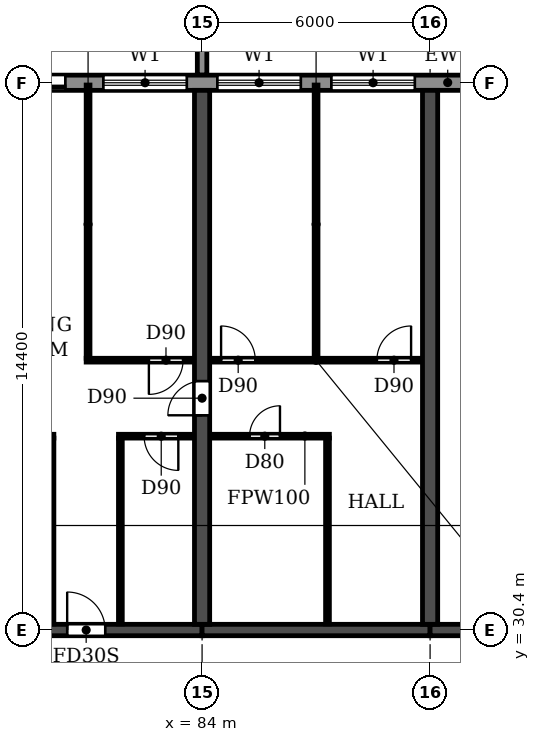
"""IFC4 building model, lengths in metres.
Left out: names, types, materials, properties, quantities, classifications, styles, units other than length and angle.
Written with IfcOpenShell. Run it as: python <this file> out.ifc"""

import sys

from ifc_helpers import new_model, si_unit, direction, frame, frame_2d, origin, place, context, subcontext, project, spatial, polyline, rectangle, outline, extrude, source, transform, mapped, element, fill, save


model = new_model("IFC4")
c1 = context("Model", 3, precision=1e-05, world=origin(), true_north=direction((0.0, 1.0)))
c2 = subcontext(c1, "Body", "Model", "MODEL_VIEW")
j1 = project(units=[si_unit("LENGTHUNIT", "METRE"), si_unit("PLANEANGLEUNIT", "RADIAN")], contexts=[c1])
p1 = place(None, origin())
s1 = spatial("IfcSite", under=j1, at=p1, CompositionType="ELEMENT")
p2 = place(p1, origin())
s2 = spatial("IfcBuilding", under=s1, at=p2, CompositionType="ELEMENT")
p3 = place(p2, frame((0.0, 0.0, 56.4)))
s3 = spatial("IfcBuildingStorey", under=s2, at=p3, CompositionType="ELEMENT", Elevation=56.4)
p4 = place(p3, frame((84.0, 30.55, 0.0), z_axis=(0.0, 0.0, 1.0), x_axis=(0.0, 1.0, 0.0)))
e1 = element("IfcWall", 1, at=p4, inside=s3, PredefinedType="SHEAR", context=c2, shape_type="SweptSolid", body=[
    extrude(rectangle(XDim=14.05, YDim=0.4, at=frame_2d((7.025, 0.0))), origin(), (0.0, 0.0, 1.0), 3.05),
])
p5 = place(p4, frame((5.5, 0.0, 0.0)))
e2 = element("IfcOpeningElement", 2, at=p5, cuts=e1, PredefinedType="OPENING", context=c2, shape_type="SweptSolid", body=[
    extrude(rectangle(XDim=0.9, YDim=2.1, at=frame_2d((0.45, 1.05))), frame((0.0, 0.21, 0.0), z_axis=(0.0, -1.0, 0.0), x_axis=(1.0, 0.0, 0.0)), (0.0, 0.0, 1.0), 0.42),
])
p6 = place(p3, frame((90.0, 30.55, 0.0), z_axis=(0.0, 0.0, 1.0), x_axis=(0.0, 1.0, 0.0)))
e3 = element("IfcWall", 3, at=p6, inside=s3, PredefinedType="SHEAR", context=c2, shape_type="SweptSolid", body=[
    extrude(rectangle(XDim=14.05, YDim=0.4, at=frame_2d((7.025, 0.0))), origin(), (0.0, 0.0, 1.0), 3.05),
])
p7 = place(p3, frame((78.0, 30.4, 0.0), z_axis=(0.0, 0.0, 1.0), x_axis=(1.0, 0.0, 0.0)))
e4 = element("IfcWall", 4, at=p7, inside=s3, PredefinedType="SHEAR", context=c2, shape_type="SweptSolid", body=[
    extrude(rectangle(XDim=6.0, YDim=0.3, at=frame_2d((3.0, 0.0))), origin(), (0.0, 0.0, 1.0), 2.45),
])
p8 = place(p7, frame((2.45, 0.0, 0.0)))
e5 = element("IfcOpeningElement", 5, at=p8, cuts=e4, PredefinedType="OPENING", context=c2, shape_type="SweptSolid", body=[
    extrude(rectangle(XDim=1.0, YDim=2.1, at=frame_2d((0.5, 1.05))), frame((0.0, 0.16, 0.0), z_axis=(0.0, -1.0, 0.0), x_axis=(1.0, 0.0, 0.0)), (0.0, 0.0, 1.0), 0.32),
])
p9 = place(p3, frame((84.0, 30.4, 0.0), z_axis=(0.0, 0.0, 1.0), x_axis=(1.0, 0.0, 0.0)))
e6 = element("IfcWall", 6, at=p9, inside=s3, PredefinedType="SHEAR", context=c2, shape_type="SweptSolid", body=[
    extrude(rectangle(XDim=6.0, YDim=0.3, at=frame_2d((3.0, 0.0))), origin(), (0.0, 0.0, 1.0), 2.45),
])
p10 = place(p3, frame((90.0, 30.4, 0.0), z_axis=(0.0, 0.0, 1.0), x_axis=(1.0, 0.0, 0.0)))
e7 = element("IfcWall", 7, at=p10, inside=s3, PredefinedType="SHEAR", context=c2, shape_type="SweptSolid", body=[
    extrude(rectangle(XDim=5.8, YDim=0.3, at=frame_2d((2.9, 0.0))), origin(), (0.0, 0.0, 1.0), 2.45),
])
p11 = place(p10, frame((2.5, 0.0, 0.0)))
e8 = element("IfcOpeningElement", 8, at=p11, cuts=e7, PredefinedType="OPENING", context=c2, shape_type="SweptSolid", body=[
    extrude(rectangle(XDim=1.0, YDim=2.1, at=frame_2d((0.5, 1.05))), frame((0.0, 0.16, 0.0), z_axis=(0.0, -1.0, 0.0), x_axis=(1.0, 0.0, 0.0)), (0.0, 0.0, 1.0), 0.32),
])
p12 = place(p3, frame((91.317, 44.8, 0.0), z_axis=(0.0, 0.0, 1.0), x_axis=(-1.0, 0.0, 0.0)))
e9 = element("IfcWall", 9, at=p12, inside=s3, PredefinedType="STANDARD", context=c2, shape_type="SweptSolid", body=[
    extrude(rectangle(XDim=80.634, YDim=0.4, at=frame_2d((40.317, 0.0))), origin(), (0.0, 0.0, 1.0), 3.05),
])
p13 = place(p12, frame((76.717, 0.0, 0.9)))
e10 = element("IfcOpeningElement", 10, at=p13, cuts=e9, PredefinedType="OPENING", context=c2, shape_type="SweptSolid", body=[
    extrude(rectangle(XDim=2.2, YDim=1.5, at=frame_2d((1.1, 0.75))), frame((0.0, 0.21, 0.0), z_axis=(0.0, -1.0, 0.0), x_axis=(1.0, 0.0, 0.0)), (0.0, 0.0, 1.0), 0.42),
])
p14 = place(p12, frame((73.917, 0.0, 0.0)))
e11 = element("IfcOpeningElement", 11, at=p14, cuts=e9, PredefinedType="OPENING", context=c2, shape_type="SweptSolid", body=[
    extrude(rectangle(XDim=1.8, YDim=2.4, at=frame_2d((0.9, 1.2))), frame((0.0, 0.21, 0.0), z_axis=(0.0, -1.0, 0.0), x_axis=(1.0, 0.0, 0.0)), (0.0, 0.0, 1.0), 0.42),
])
p15 = place(p12, frame((70.717, 0.0, 0.9)))
e12 = element("IfcOpeningElement", 12, at=p15, cuts=e9, PredefinedType="OPENING", context=c2, shape_type="SweptSolid", body=[
    extrude(rectangle(XDim=2.2, YDim=1.5, at=frame_2d((1.1, 0.75))), frame((0.0, 0.21, 0.0), z_axis=(0.0, -1.0, 0.0), x_axis=(1.0, 0.0, 0.0)), (0.0, 0.0, 1.0), 0.42),
])
p16 = place(p12, frame((67.917, 0.0, 0.0)))
e13 = element("IfcOpeningElement", 13, at=p16, cuts=e9, PredefinedType="OPENING", context=c2, shape_type="SweptSolid", body=[
    extrude(rectangle(XDim=1.8, YDim=2.4, at=frame_2d((0.9, 1.2))), frame((0.0, 0.21, 0.0), z_axis=(0.0, -1.0, 0.0), x_axis=(1.0, 0.0, 0.0)), (0.0, 0.0, 1.0), 0.42),
])
p17 = place(p12, frame((64.717, 0.0, 0.9)))
e14 = element("IfcOpeningElement", 14, at=p17, cuts=e9, PredefinedType="OPENING", context=c2, shape_type="SweptSolid", body=[
    extrude(rectangle(XDim=2.2, YDim=1.5, at=frame_2d((1.1, 0.75))), frame((0.0, 0.21, 0.0), z_axis=(0.0, -1.0, 0.0), x_axis=(1.0, 0.0, 0.0)), (0.0, 0.0, 1.0), 0.42),
])
p18 = place(p12, frame((61.917, 0.0, 0.0)))
e15 = element("IfcOpeningElement", 15, at=p18, cuts=e9, PredefinedType="OPENING", context=c2, shape_type="SweptSolid", body=[
    extrude(rectangle(XDim=1.8, YDim=2.4, at=frame_2d((0.9, 1.2))), frame((0.0, 0.21, 0.0), z_axis=(0.0, -1.0, 0.0), x_axis=(1.0, 0.0, 0.0)), (0.0, 0.0, 1.0), 0.42),
])
p19 = place(p12, frame((58.717, 0.0, 0.9)))
e16 = element("IfcOpeningElement", 16, at=p19, cuts=e9, PredefinedType="OPENING", context=c2, shape_type="SweptSolid", body=[
    extrude(rectangle(XDim=2.2, YDim=1.5, at=frame_2d((1.1, 0.75))), frame((0.0, 0.21, 0.0), z_axis=(0.0, -1.0, 0.0), x_axis=(1.0, 0.0, 0.0)), (0.0, 0.0, 1.0), 0.42),
])
p20 = place(p12, frame((55.717, 0.0, 0.9)))
e17 = element("IfcOpeningElement", 17, at=p20, cuts=e9, PredefinedType="OPENING", context=c2, shape_type="SweptSolid", body=[
    extrude(rectangle(XDim=2.2, YDim=1.5, at=frame_2d((1.1, 0.75))), frame((0.0, 0.21, 0.0), z_axis=(0.0, -1.0, 0.0), x_axis=(1.0, 0.0, 0.0)), (0.0, 0.0, 1.0), 0.42),
])
p21 = place(p12, frame((52.917, 0.0, 0.0)))
e18 = element("IfcOpeningElement", 18, at=p21, cuts=e9, PredefinedType="OPENING", context=c2, shape_type="SweptSolid", body=[
    extrude(rectangle(XDim=1.8, YDim=2.4, at=frame_2d((0.9, 1.2))), frame((0.0, 0.21, 0.0), z_axis=(0.0, -1.0, 0.0), x_axis=(1.0, 0.0, 0.0)), (0.0, 0.0, 1.0), 0.42),
])
p22 = place(p12, frame((49.717, 0.0, 0.9)))
e19 = element("IfcOpeningElement", 19, at=p22, cuts=e9, PredefinedType="OPENING", context=c2, shape_type="SweptSolid", body=[
    extrude(rectangle(XDim=2.2, YDim=1.5, at=frame_2d((1.1, 0.75))), frame((0.0, 0.21, 0.0), z_axis=(0.0, -1.0, 0.0), x_axis=(1.0, 0.0, 0.0)), (0.0, 0.0, 1.0), 0.42),
])
p23 = place(p12, frame((46.917, 0.0, 0.0)))
e20 = element("IfcOpeningElement", 20, at=p23, cuts=e9, PredefinedType="OPENING", context=c2, shape_type="SweptSolid", body=[
    extrude(rectangle(XDim=1.8, YDim=2.4, at=frame_2d((0.9, 1.2))), frame((0.0, 0.21, 0.0), z_axis=(0.0, -1.0, 0.0), x_axis=(1.0, 0.0, 0.0)), (0.0, 0.0, 1.0), 0.42),
])
p24 = place(p12, frame((43.717, 0.0, 0.9)))
e21 = element("IfcOpeningElement", 21, at=p24, cuts=e9, PredefinedType="OPENING", context=c2, shape_type="SweptSolid", body=[
    extrude(rectangle(XDim=2.2, YDim=1.5, at=frame_2d((1.1, 0.75))), frame((0.0, 0.21, 0.0), z_axis=(0.0, -1.0, 0.0), x_axis=(1.0, 0.0, 0.0)), (0.0, 0.0, 1.0), 0.42),
])
p25 = place(p12, frame((40.717, 0.0, 0.9)))
e22 = element("IfcOpeningElement", 22, at=p25, cuts=e9, PredefinedType="OPENING", context=c2, shape_type="SweptSolid", body=[
    extrude(rectangle(XDim=2.2, YDim=1.5, at=frame_2d((1.1, 0.75))), frame((0.0, 0.21, 0.0), z_axis=(0.0, -1.0, 0.0), x_axis=(1.0, 0.0, 0.0)), (0.0, 0.0, 1.0), 0.42),
])
p26 = place(p12, frame((37.717, 0.0, 0.9)))
e23 = element("IfcOpeningElement", 23, at=p26, cuts=e9, PredefinedType="OPENING", context=c2, shape_type="SweptSolid", body=[
    extrude(rectangle(XDim=2.2, YDim=1.5, at=frame_2d((1.1, 0.75))), frame((0.0, 0.21, 0.0), z_axis=(0.0, -1.0, 0.0), x_axis=(1.0, 0.0, 0.0)), (0.0, 0.0, 1.0), 0.42),
])
p27 = place(p12, frame((34.717, 0.0, 0.9)))
e24 = element("IfcOpeningElement", 24, at=p27, cuts=e9, PredefinedType="OPENING", context=c2, shape_type="SweptSolid", body=[
    extrude(rectangle(XDim=2.2, YDim=1.5, at=frame_2d((1.1, 0.75))), frame((0.0, 0.21, 0.0), z_axis=(0.0, -1.0, 0.0), x_axis=(1.0, 0.0, 0.0)), (0.0, 0.0, 1.0), 0.42),
])
p28 = place(p12, frame((31.917, 0.0, 0.0)))
e25 = element("IfcOpeningElement", 25, at=p28, cuts=e9, PredefinedType="OPENING", context=c2, shape_type="SweptSolid", body=[
    extrude(rectangle(XDim=1.8, YDim=2.4, at=frame_2d((0.9, 1.2))), frame((0.0, 0.21, 0.0), z_axis=(0.0, -1.0, 0.0), x_axis=(1.0, 0.0, 0.0)), (0.0, 0.0, 1.0), 0.42),
])
p29 = place(p12, frame((28.917, 0.0, 0.0)))
e26 = element("IfcOpeningElement", 26, at=p29, cuts=e9, PredefinedType="OPENING", context=c2, shape_type="SweptSolid", body=[
    extrude(rectangle(XDim=1.8, YDim=2.4, at=frame_2d((0.9, 1.2))), frame((0.0, 0.21, 0.0), z_axis=(0.0, -1.0, 0.0), x_axis=(1.0, 0.0, 0.0)), (0.0, 0.0, 1.0), 0.42),
])
p30 = place(p12, frame((25.717, 0.0, 0.9)))
e27 = element("IfcOpeningElement", 27, at=p30, cuts=e9, PredefinedType="OPENING", context=c2, shape_type="SweptSolid", body=[
    extrude(rectangle(XDim=2.2, YDim=1.5, at=frame_2d((1.1, 0.75))), frame((0.0, 0.21, 0.0), z_axis=(0.0, -1.0, 0.0), x_axis=(1.0, 0.0, 0.0)), (0.0, 0.0, 1.0), 0.42),
])
p31 = place(p12, frame((22.917, 0.0, 0.0)))
e28 = element("IfcOpeningElement", 28, at=p31, cuts=e9, PredefinedType="OPENING", context=c2, shape_type="SweptSolid", body=[
    extrude(rectangle(XDim=1.8, YDim=2.4, at=frame_2d((0.9, 1.2))), frame((0.0, 0.21, 0.0), z_axis=(0.0, -1.0, 0.0), x_axis=(1.0, 0.0, 0.0)), (0.0, 0.0, 1.0), 0.42),
])
p32 = place(p12, frame((19.717, 0.0, 0.9)))
e29 = element("IfcOpeningElement", 29, at=p32, cuts=e9, PredefinedType="OPENING", context=c2, shape_type="SweptSolid", body=[
    extrude(rectangle(XDim=2.2, YDim=1.5, at=frame_2d((1.1, 0.75))), frame((0.0, 0.21, 0.0), z_axis=(0.0, -1.0, 0.0), x_axis=(1.0, 0.0, 0.0)), (0.0, 0.0, 1.0), 0.42),
])
p33 = place(p12, frame((16.917, 0.0, 0.0)))
e30 = element("IfcOpeningElement", 30, at=p33, cuts=e9, PredefinedType="OPENING", context=c2, shape_type="SweptSolid", body=[
    extrude(rectangle(XDim=1.8, YDim=2.4, at=frame_2d((0.9, 1.2))), frame((0.0, 0.21, 0.0), z_axis=(0.0, -1.0, 0.0), x_axis=(1.0, 0.0, 0.0)), (0.0, 0.0, 1.0), 0.42),
])
p34 = place(p12, frame((13.717, 0.0, 0.9)))
e31 = element("IfcOpeningElement", 31, at=p34, cuts=e9, PredefinedType="OPENING", context=c2, shape_type="SweptSolid", body=[
    extrude(rectangle(XDim=2.2, YDim=1.5, at=frame_2d((1.1, 0.75))), frame((0.0, 0.21, 0.0), z_axis=(0.0, -1.0, 0.0), x_axis=(1.0, 0.0, 0.0)), (0.0, 0.0, 1.0), 0.42),
])
p35 = place(p12, frame((10.917, 0.0, 0.0)))
e32 = element("IfcOpeningElement", 32, at=p35, cuts=e9, PredefinedType="OPENING", context=c2, shape_type="SweptSolid", body=[
    extrude(rectangle(XDim=1.8, YDim=2.4, at=frame_2d((0.9, 1.2))), frame((0.0, 0.21, 0.0), z_axis=(0.0, -1.0, 0.0), x_axis=(1.0, 0.0, 0.0)), (0.0, 0.0, 1.0), 0.42),
])
p36 = place(p12, frame((7.717, 0.0, 0.9)))
e33 = element("IfcOpeningElement", 33, at=p36, cuts=e9, PredefinedType="OPENING", context=c2, shape_type="SweptSolid", body=[
    extrude(rectangle(XDim=2.2, YDim=1.5, at=frame_2d((1.1, 0.75))), frame((0.0, 0.21, 0.0), z_axis=(0.0, -1.0, 0.0), x_axis=(1.0, 0.0, 0.0)), (0.0, 0.0, 1.0), 0.42),
])
p37 = place(p12, frame((4.717, 0.0, 0.9)))
e34 = element("IfcOpeningElement", 34, at=p37, cuts=e9, PredefinedType="OPENING", context=c2, shape_type="SweptSolid", body=[
    extrude(rectangle(XDim=2.2, YDim=1.5, at=frame_2d((1.1, 0.75))), frame((0.0, 0.21, 0.0), z_axis=(0.0, -1.0, 0.0), x_axis=(1.0, 0.0, 0.0)), (0.0, 0.0, 1.0), 0.42),
])
p38 = place(p12, frame((1.717, 0.0, 0.9)))
e35 = element("IfcOpeningElement", 35, at=p38, cuts=e9, PredefinedType="OPENING", context=c2, shape_type="SweptSolid", body=[
    extrude(rectangle(XDim=2.2, YDim=1.5, at=frame_2d((1.1, 0.75))), frame((0.0, 0.21, 0.0), z_axis=(0.0, -1.0, 0.0), x_axis=(1.0, 0.0, 0.0)), (0.0, 0.0, 1.0), 0.42),
])
m1 = source(origin(), c2, "Body", "SweptSolid", [
    extrude(outline(polyline([(0.0, 0.0), (0.25, 0.0), (0.25, 3.1), (0.0, 3.1), (0.0, 0.0)])), origin(), (0.0, 0.0, 1.0), 3.1),
])
p39 = place(p3, frame((83.875, 45.0, 0.0)))
e36 = element("IfcWall", 36, at=p39, inside=s3, PredefinedType="STANDARD", context=c2, shape_type="MappedRepresentation", body=[
    mapped(m1, transform((0.0, 0.0, 0.0))),
])
p40 = place(p3, frame((78.21, 35.5, 0.0), z_axis=(0.0, 0.0, 1.0), x_axis=(1.0, 0.0, 0.0)))
e37 = element("IfcWall", 37, at=p40, inside=s3, PredefinedType="PARTITIONING", context=c2, shape_type="SweptSolid", body=[
    extrude(rectangle(XDim=1.89, YDim=0.1, at=frame_2d((0.945, 0.0))), origin(), (0.0, 0.0, 1.0), 3.05),
])
p41 = place(p40, frame((0.415, 0.0, 0.0)))
e38 = element("IfcOpeningElement", 38, at=p41, cuts=e37, PredefinedType="OPENING", context=c2, shape_type="SweptSolid", body=[
    extrude(rectangle(XDim=0.8, YDim=2.1, at=frame_2d((0.4, 1.05))), frame((0.0, 0.06, 0.0), z_axis=(0.0, -1.0, 0.0), x_axis=(1.0, 0.0, 0.0)), (0.0, 0.0, 1.0), 0.12),
])
p42 = place(p3, frame((81.8, 35.5, 0.0), z_axis=(0.0, 0.0, 1.0), x_axis=(1.0, 0.0, 0.0)))
e39 = element("IfcWall", 39, at=p42, inside=s3, PredefinedType="PARTITIONING", context=c2, shape_type="SweptSolid", body=[
    extrude(rectangle(XDim=1.99, YDim=0.1, at=frame_2d((0.995, 0.0))), origin(), (0.0, 0.0, 1.0), 3.05),
])
p43 = place(p42, frame((0.675, 0.0, 0.0)))
e40 = element("IfcOpeningElement", 40, at=p43, cuts=e39, PredefinedType="OPENING", context=c2, shape_type="SweptSolid", body=[
    extrude(rectangle(XDim=0.9, YDim=2.1, at=frame_2d((0.45, 1.05))), frame((0.0, 0.06, 0.0), z_axis=(0.0, -1.0, 0.0), x_axis=(1.0, 0.0, 0.0)), (0.0, 0.0, 1.0), 0.12),
])
p44 = place(p3, frame((84.21, 35.5, 0.0), z_axis=(0.0, 0.0, 1.0), x_axis=(1.0, 0.0, 0.0)))
e41 = element("IfcWall", 41, at=p44, inside=s3, PredefinedType="PARTITIONING", context=c2, shape_type="SweptSolid", body=[
    extrude(rectangle(XDim=3.14, YDim=0.1, at=frame_2d((1.57, 0.0))), origin(), (0.0, 0.0, 1.0), 3.05),
])
p45 = place(p44, frame((1.04, 0.0, 0.0)))
e42 = element("IfcOpeningElement", 42, at=p45, cuts=e41, PredefinedType="OPENING", context=c2, shape_type="SweptSolid", body=[
    extrude(rectangle(XDim=0.8, YDim=2.1, at=frame_2d((0.4, 1.05))), frame((0.0, 0.06, 0.0), z_axis=(0.0, -1.0, 0.0), x_axis=(1.0, 0.0, 0.0)), (0.0, 0.0, 1.0), 0.12),
])
p46 = place(p3, frame((80.95, 37.5, 0.0), z_axis=(0.0, 0.0, 1.0), x_axis=(1.0, 0.0, 0.0)))
e43 = element("IfcWall", 43, at=p46, inside=s3, PredefinedType="PARTITIONING", context=c2, shape_type="SweptSolid", body=[
    extrude(rectangle(XDim=2.84, YDim=0.1, at=frame_2d((1.42, 0.0))), origin(), (0.0, 0.0, 1.0), 3.05),
])
p47 = place(p46, frame((1.65, 0.0, 0.0)))
e44 = element("IfcOpeningElement", 44, at=p47, cuts=e43, PredefinedType="OPENING", context=c2, shape_type="SweptSolid", body=[
    extrude(rectangle(XDim=0.9, YDim=2.1, at=frame_2d((0.45, 1.05))), frame((0.0, 0.06, 0.0), z_axis=(0.0, -1.0, 0.0), x_axis=(1.0, 0.0, 0.0)), (0.0, 0.0, 1.0), 0.12),
])
p48 = place(p3, frame((84.21, 37.5, 0.0), z_axis=(0.0, 0.0, 1.0), x_axis=(1.0, 0.0, 0.0)))
e45 = element("IfcWall", 45, at=p48, inside=s3, PredefinedType="PARTITIONING", context=c2, shape_type="SweptSolid", body=[
    extrude(rectangle(XDim=5.58, YDim=0.1, at=frame_2d((2.79, 0.0))), origin(), (0.0, 0.0, 1.0), 3.05),
])
p49 = place(p48, frame((0.29, 0.0, 0.0)))
e46 = element("IfcOpeningElement", 46, at=p49, cuts=e45, PredefinedType="OPENING", context=c2, shape_type="SweptSolid", body=[
    extrude(rectangle(XDim=0.9, YDim=2.1, at=frame_2d((0.45, 1.05))), frame((0.0, 0.06, 0.0), z_axis=(0.0, -1.0, 0.0), x_axis=(1.0, 0.0, 0.0)), (0.0, 0.0, 1.0), 0.12),
])
p50 = place(p48, frame((4.39, 0.0, 0.0)))
e47 = element("IfcOpeningElement", 47, at=p50, cuts=e45, PredefinedType="OPENING", context=c2, shape_type="SweptSolid", body=[
    extrude(rectangle(XDim=0.9, YDim=2.1, at=frame_2d((0.45, 1.05))), frame((0.0, 0.06, 0.0), z_axis=(0.0, -1.0, 0.0), x_axis=(1.0, 0.0, 0.0)), (0.0, 0.0, 1.0), 0.12),
])
p51 = place(p3, frame((80.05, 30.56, 0.0), z_axis=(0.0, 0.0, 1.0), x_axis=(0.0, 1.0, 0.0)))
e48 = element("IfcWall", 48, at=p51, inside=s3, PredefinedType="PARTITIONING", context=c2, shape_type="SweptSolid", body=[
    extrude(rectangle(XDim=4.89, YDim=0.1, at=frame_2d((2.445, 0.0))), origin(), (0.0, 0.0, 1.0), 3.05),
])
p52 = place(p3, frame((81.0, 37.55, 0.0), z_axis=(0.0, 0.0, 1.0), x_axis=(0.0, 1.0, 0.0)))
e49 = element("IfcWall", 49, at=p52, inside=s3, PredefinedType="PARTITIONING", context=c2, shape_type="SweptSolid", body=[
    extrude(rectangle(XDim=7.19, YDim=0.1, at=frame_2d((3.595, 0.0))), origin(), (0.0, 0.0, 1.0), 3.05),
])
p53 = place(p3, frame((81.85, 30.56, 0.0), z_axis=(0.0, 0.0, 1.0), x_axis=(0.0, 1.0, 0.0)))
e50 = element("IfcWall", 50, at=p53, inside=s3, PredefinedType="PARTITIONING", context=c2, shape_type="SweptSolid", body=[
    extrude(rectangle(XDim=4.89, YDim=0.1, at=frame_2d((2.445, 0.0))), origin(), (0.0, 0.0, 1.0), 3.05),
])
p54 = place(p3, frame((87.0, 37.55, 0.0), z_axis=(0.0, 0.0, 1.0), x_axis=(0.0, 1.0, 0.0)))
e51 = element("IfcWall", 51, at=p54, inside=s3, PredefinedType="PARTITIONING", context=c2, shape_type="SweptSolid", body=[
    extrude(rectangle(XDim=7.19, YDim=0.1, at=frame_2d((3.595, 0.0))), origin(), (0.0, 0.0, 1.0), 3.05),
])
p55 = place(p3, frame((87.3, 30.56, 0.0), z_axis=(0.0, 0.0, 1.0), x_axis=(0.0, 1.0, 0.0)))
e52 = element("IfcWall", 52, at=p55, inside=s3, PredefinedType="PARTITIONING", context=c2, shape_type="SweptSolid", body=[
    extrude(rectangle(XDim=4.89, YDim=0.1, at=frame_2d((2.445, 0.0))), origin(), (0.0, 0.0, 1.0), 3.05),
])
p56 = place(p35, origin())
e53 = element("IfcDoor", 53, at=p56, inside=s3, OperationType="DOUBLE_DOOR_SLIDING", PredefinedType="DOOR", context=c2, shape_type="SweptSolid", body=[
    extrude(rectangle(XDim=1.8, YDim=2.4, at=frame_2d((0.9, 1.2))), frame((0.0, 0.025, 0.0), z_axis=(0.0, -1.0, 0.0), x_axis=(1.0, 0.0, 0.0)), (0.0, 0.0, 1.0), 0.05),
])
fill(e32, e53)
p57 = place(p36, origin())
e54 = element("IfcWindow", 54, at=p57, inside=s3, PartitioningType="DOUBLE_PANEL_HORIZONTAL", PredefinedType="WINDOW", context=c2, shape_type="SweptSolid", body=[
    extrude(rectangle(XDim=2.2, YDim=1.5, at=frame_2d((1.1, 0.75))), frame((0.0, 0.03, 0.0), z_axis=(0.0, -1.0, 0.0), x_axis=(1.0, 0.0, 0.0)), (0.0, 0.0, 1.0), 0.06),
])
fill(e33, e54)
p58 = place(p37, origin())
e55 = element("IfcWindow", 55, at=p58, inside=s3, PartitioningType="DOUBLE_PANEL_HORIZONTAL", PredefinedType="WINDOW", context=c2, shape_type="SweptSolid", body=[
    extrude(rectangle(XDim=2.2, YDim=1.5, at=frame_2d((1.1, 0.75))), frame((0.0, 0.03, 0.0), z_axis=(0.0, -1.0, 0.0), x_axis=(1.0, 0.0, 0.0)), (0.0, 0.0, 1.0), 0.06),
])
fill(e34, e55)
p59 = place(p38, origin())
e56 = element("IfcWindow", 56, at=p59, inside=s3, PartitioningType="DOUBLE_PANEL_HORIZONTAL", PredefinedType="WINDOW", context=c2, shape_type="SweptSolid", body=[
    extrude(rectangle(XDim=2.2, YDim=1.5, at=frame_2d((1.1, 0.75))), frame((0.0, 0.03, 0.0), z_axis=(0.0, -1.0, 0.0), x_axis=(1.0, 0.0, 0.0)), (0.0, 0.0, 1.0), 0.06),
])
fill(e35, e56)
p60 = place(p49, origin())
e57 = element("IfcDoor", 57, at=p60, inside=s3, OperationType="SINGLE_SWING_LEFT", PredefinedType="DOOR", context=c2, shape_type="SweptSolid", body=[
    extrude(rectangle(XDim=0.9, YDim=2.1, at=frame_2d((0.45, 1.05))), frame((0.0, 0.025, 0.0), z_axis=(0.0, -1.0, 0.0), x_axis=(1.0, 0.0, 0.0)), (0.0, 0.0, 1.0), 0.05),
])
fill(e46, e57)
p61 = place(p45, origin())
e58 = element("IfcDoor", 58, at=p61, inside=s3, OperationType="SINGLE_SWING_RIGHT", PredefinedType="DOOR", context=c2, shape_type="SweptSolid", body=[
    extrude(rectangle(XDim=0.8, YDim=2.1, at=frame_2d((0.4, 1.05))), frame((0.0, 0.025, 0.0), z_axis=(0.0, -1.0, 0.0), x_axis=(1.0, 0.0, 0.0)), (0.0, 0.0, 1.0), 0.05),
])
fill(e42, e58)
p62 = place(p50, origin())
e59 = element("IfcDoor", 59, at=p62, inside=s3, OperationType="SINGLE_SWING_RIGHT", PredefinedType="DOOR", context=c2, shape_type="SweptSolid", body=[
    extrude(rectangle(XDim=0.9, YDim=2.1, at=frame_2d((0.45, 1.05))), frame((0.0, 0.025, 0.0), z_axis=(0.0, -1.0, 0.0), x_axis=(1.0, 0.0, 0.0)), (0.0, 0.0, 1.0), 0.05),
])
fill(e47, e59)
p63 = place(p8, origin())
e60 = element("IfcDoor", 60, at=p63, inside=s3, OperationType="SINGLE_SWING_LEFT", PredefinedType="DOOR", context=c2, shape_type="SweptSolid", body=[
    extrude(rectangle(XDim=1.0, YDim=2.1, at=frame_2d((0.5, 1.05))), frame((0.0, 0.025, 0.0), z_axis=(0.0, -1.0, 0.0), x_axis=(1.0, 0.0, 0.0)), (0.0, 0.0, 1.0), 0.05),
])
fill(e5, e60)
p64 = place(p43, frame((0.9, 0.0, 0.0), z_axis=(0.0, 0.0, 1.0), x_axis=(-1.0, 0.0, 0.0)))
e61 = element("IfcDoor", 61, at=p64, inside=s3, OperationType="SINGLE_SWING_LEFT", PredefinedType="DOOR", context=c2, shape_type="SweptSolid", body=[
    extrude(rectangle(XDim=0.9, YDim=2.1, at=frame_2d((0.45, 1.05))), frame((0.0, 0.025, 0.0), z_axis=(0.0, -1.0, 0.0), x_axis=(1.0, 0.0, 0.0)), (0.0, 0.0, 1.0), 0.05),
])
fill(e40, e61)
p65 = place(p47, frame((0.9, 0.0, 0.0), z_axis=(0.0, 0.0, 1.0), x_axis=(-1.0, 0.0, 0.0)))
e62 = element("IfcDoor", 62, at=p65, inside=s3, OperationType="SINGLE_SWING_RIGHT", PredefinedType="DOOR", context=c2, shape_type="SweptSolid", body=[
    extrude(rectangle(XDim=0.9, YDim=2.1, at=frame_2d((0.45, 1.05))), frame((0.0, 0.025, 0.0), z_axis=(0.0, -1.0, 0.0), x_axis=(1.0, 0.0, 0.0)), (0.0, 0.0, 1.0), 0.05),
])
fill(e44, e62)
p66 = place(p5, origin())
e63 = element("IfcDoor", 63, at=p66, inside=s3, OperationType="SINGLE_SWING_LEFT", PredefinedType="DOOR", context=c2, shape_type="SweptSolid", body=[
    extrude(rectangle(XDim=0.9, YDim=2.1, at=frame_2d((0.45, 1.05))), frame((0.0, 0.025, 0.0), z_axis=(0.0, -1.0, 0.0), x_axis=(1.0, 0.0, 0.0)), (0.0, 0.0, 1.0), 0.05),
])
fill(e2, e63)
save(model, sys.argv[1])
